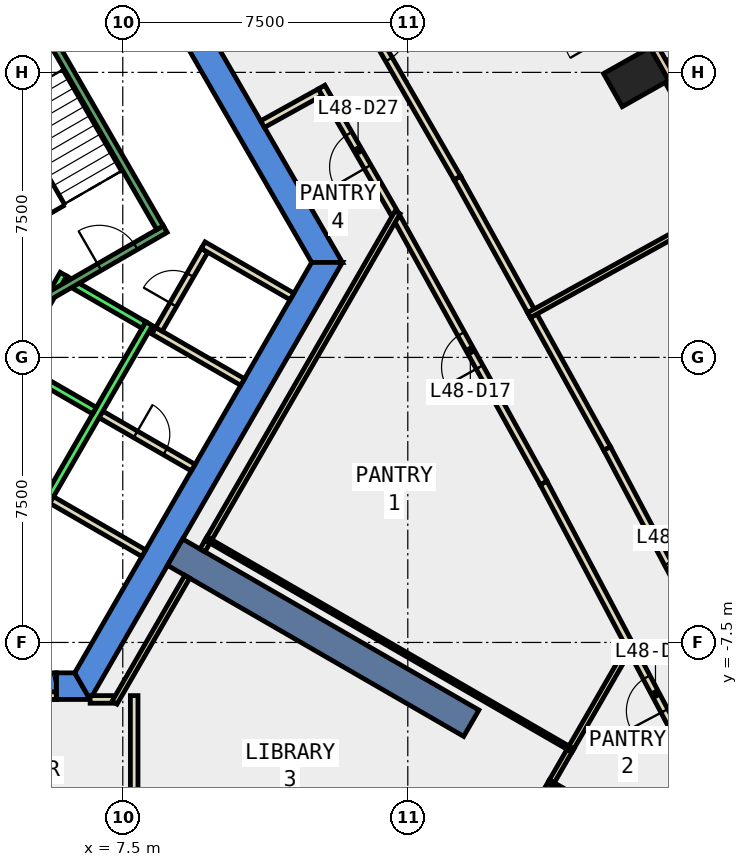
"""IFC4 building model, lengths in metres.
Left out: names, types, materials, properties, quantities, classifications, styles, units other than length and angle.
Written with IfcOpenShell. Run it as: python <this file> out.ifc"""

import sys

from ifc_helpers import new_model, si_unit, direction, frame, frame_2d, origin, origin_2d, place, context, subcontext, project, spatial, polyline, rectangle, outline, extrude, element, fill, save


model = new_model("IFC4")
c1 = context("Model", 3, precision=1e-05, world=origin(), true_north=direction((0.0, 1.0)))
c2 = subcontext(c1, "Body", "Model", "MODEL_VIEW")
j1 = project(units=[si_unit("LENGTHUNIT", "METRE"), si_unit("PLANEANGLEUNIT", "RADIAN")], contexts=[c1])
p1 = place(None, origin())
s1 = spatial("IfcSite", under=j1, at=p1, CompositionType="ELEMENT")
p2 = place(p1, origin())
s2 = spatial("IfcBuilding", under=s1, at=p2, CompositionType="ELEMENT")
p3 = place(p2, frame((0.0, 0.0, 215.0)))
s3 = spatial("IfcBuildingStorey", under=s2, at=p3, CompositionType="ELEMENT", Elevation=215.0)
p4 = place(p3, frame((21.007, 7.377, -0.4), z_axis=(0.0, 0.0, 1.0), x_axis=(-0.491435856222, 0.870913772551, 0.0)))
e1 = element("IfcColumn", 1, at=p4, inside=s3, PredefinedType="COLUMN", context=c2, shape_type="SweptSolid", body=[
    extrude(rectangle(XDim=1.0, YDim=1.4, at=origin_2d()), origin(), (0.0, 0.0, 1.0), 4.2),
])
p5 = place(p3, frame((0.0, 0.0, -0.4)))
e2 = element("IfcWall", 2, at=p5, inside=s3, PredefinedType="SHEAR", context=c2, shape_type="SweptSolid", body=[
    extrude(outline(polyline([(8.084, 11.498), (7.478, 11.148), (12.471, 2.5), (13.279, 2.5), (8.084, 11.498)])), origin(), (0.0, 0.0, 1.0), 4.2),
])
p6 = place(p3, frame((0.0, 0.0, -0.4)))
e3 = element("IfcWall", 3, at=p6, inside=s3, PredefinedType="SHEAR", context=c2, shape_type="SweptSolid", body=[
    extrude(outline(polyline([(5.75, -8.3), (5.75, -9.0), (6.64, -9.0), (6.235, -8.3), (5.75, -8.3)])), origin(), (0.0, 0.0, 1.0), 4.2),
])
p7 = place(p3, frame((0.0, 0.0, 3.6)))
e4 = element("IfcWall", 4, at=p7, inside=s3, PredefinedType="SHEAR", context=c2, shape_type="SweptSolid", body=[
    extrude(outline(polyline([(5.75, -9.0), (5.75, -8.3), (3.75, -8.3), (3.75, -9.0), (5.75, -9.0)])), origin(), (0.0, 0.0, 1.0), 0.2),
])
p8 = place(p3, frame((0.0, 0.0, -0.4)))
e5 = element("IfcWall", 5, at=p8, inside=s3, PredefinedType="SHEAR", context=c2, shape_type="SweptSolid", body=[
    extrude(outline(polyline([(6.64, -9.0), (13.279, 2.5), (12.471, 2.5), (6.235, -8.3), (6.64, -9.0)])), origin(), (0.0, 0.0, 1.0), 4.2),
])
p9 = place(p3, frame((8.877, -5.125, -0.4), z_axis=(0.0, 0.0, 1.0), x_axis=(0.866017533419, -0.500013631625, 0.0)))
e6 = element("IfcWall", 6, at=p9, inside=s3, PredefinedType="SHEAR", context=c2, shape_type="SweptSolid", body=[
    extrude(rectangle(XDim=9.0, YDim=0.8, at=frame_2d((4.5, 0.0))), origin(), (0.0, 0.0, 1.0), 4.2),
])
p10 = place(p3, frame((21.95, 7.334, 0.0), z_axis=(0.0, 0.0, 1.0), x_axis=(-0.491743606947, 0.87074004446, 0.0)))
e7 = element("IfcWall", 7, at=p10, inside=s3, PredefinedType="STANDARD", context=c2, shape_type="SweptSolid", body=[
    extrude(rectangle(XDim=1.0, YDim=0.2, at=frame_2d((0.5, 0.0))), origin(), (0.0, 0.0, 1.0), 3.8),
])
p11 = place(p3, frame((25.411, 0.968, 0.0), z_axis=(0.0, 0.0, 1.0), x_axis=(-0.484163461668, 0.87497756679, 0.0)))
e8 = element("IfcWall", 8, at=p11, inside=s3, PredefinedType="STANDARD", context=c2, shape_type="SweptSolid", body=[
    extrude(rectangle(XDim=7.247, YDim=0.3, at=frame_2d((3.624, 0.0))), origin(), (0.0, 0.0, 1.0), 3.8),
])
p12 = place(p11, frame((0.612, 0.0, 0.9)))
e9 = element("IfcOpeningElement", 9, at=p12, cuts=e8, PredefinedType="OPENING", context=c2, shape_type="SweptSolid", body=[
    extrude(rectangle(XDim=2.4, YDim=2.6, at=frame_2d((1.2, 1.3))), frame((0.0, 0.16, 0.0), z_axis=(0.0, -1.0, 0.0), x_axis=(1.0, 0.0, 0.0)), (0.0, 0.0, 1.0), 0.32),
])
p13 = place(p11, frame((4.235, 0.0, 0.9)))
e10 = element("IfcOpeningElement", 10, at=p13, cuts=e8, PredefinedType="OPENING", context=c2, shape_type="SweptSolid", body=[
    extrude(rectangle(XDim=2.4, YDim=2.6, at=frame_2d((1.2, 1.3))), frame((0.0, 0.16, 0.0), z_axis=(0.0, -1.0, 0.0), x_axis=(1.0, 0.0, 0.0)), (0.0, 0.0, 1.0), 0.32),
])
p14 = place(p3, frame((14.652, 3.783, 0.0), z_axis=(0.0, 0.0, 1.0), x_axis=(-0.499821427992, 0.866128477837, 0.0)))
e11 = element("IfcWall", 11, at=p14, inside=s3, PredefinedType="PARTITIONING", context=c2, shape_type="SweptSolid", body=[
    extrude(rectangle(XDim=3.844, YDim=0.2, at=frame_2d((1.922, 0.0))), origin(), (0.0, 0.0, 1.0), 3.8),
])
p15 = place(p14, frame((1.421, 0.0, 0.0)))
e12 = element("IfcOpeningElement", 12, at=p15, cuts=e11, PredefinedType="OPENING", context=c2, shape_type="SweptSolid", body=[
    extrude(rectangle(XDim=1.0, YDim=2.1, at=frame_2d((0.5, 1.05))), frame((0.0, 0.11, 0.0), z_axis=(0.0, -1.0, 0.0), x_axis=(1.0, 0.0, 0.0)), (0.0, 0.0, 1.0), 0.22),
])
p16 = place(p3, frame((12.693, 6.976, 0.0), z_axis=(0.0, 0.0, 1.0), x_axis=(-0.874908151187, -0.484288887944, 0.0)))
e13 = element("IfcWall", 13, at=p16, inside=s3, PredefinedType="PARTITIONING", context=c2, shape_type="SweptSolid", body=[
    extrude(rectangle(XDim=1.731, YDim=0.2, at=frame_2d((0.865, 0.0))), origin(), (0.0, 0.0, 1.0), 3.8),
])
p17 = place(p3, frame((20.882, -7.659, 0.0), z_axis=(0.0, 0.0, 1.0), x_axis=(-0.468206254133, 0.883619207346, 0.0)))
e14 = element("IfcWall", 14, at=p17, inside=s3, PredefinedType="PARTITIONING", context=c2, shape_type="SweptSolid", body=[
    extrude(rectangle(XDim=4.93, YDim=0.2, at=frame_2d((2.465, 0.0))), origin(), (0.0, 0.0, 1.0), 3.8),
])
p18 = place(p3, frame((18.574, -3.303, 0.0), z_axis=(0.0, 0.0, 1.0), x_axis=(-0.484239190765, 0.874935658279, 0.0)))
e15 = element("IfcWall", 15, at=p18, inside=s3, PredefinedType="PARTITIONING", context=c2, shape_type="SweptSolid", body=[
    extrude(rectangle(XDim=7.963, YDim=0.2, at=frame_2d((3.981, 0.0))), origin(), (0.0, 0.0, 1.0), 3.8),
])
p19 = place(p18, frame((3.482, 0.0, 0.0)))
e16 = element("IfcOpeningElement", 16, at=p19, cuts=e15, PredefinedType="OPENING", context=c2, shape_type="SweptSolid", body=[
    extrude(rectangle(XDim=1.0, YDim=2.1, at=frame_2d((0.5, 1.05))), frame((0.0, 0.11, 0.0), z_axis=(0.0, -1.0, 0.0), x_axis=(1.0, 0.0, 0.0)), (0.0, 0.0, 1.0), 0.22),
])
p20 = place(p3, frame((22.154, -10.06, 0.0), z_axis=(0.0, 0.0, 1.0), x_axis=(-0.468114756541, 0.883667683413, 0.0)))
e17 = element("IfcWall", 17, at=p20, inside=s3, PredefinedType="PARTITIONING", context=c2, shape_type="SweptSolid", body=[
    extrude(rectangle(XDim=2.717, YDim=0.2, at=frame_2d((1.359, 0.0))), origin(), (0.0, 0.0, 1.0), 3.8),
])
p21 = place(p20, frame((0.859, 0.0, 0.0)))
e18 = element("IfcOpeningElement", 18, at=p21, cuts=e17, PredefinedType="OPENING", context=c2, shape_type="SweptSolid", body=[
    extrude(rectangle(XDim=1.0, YDim=2.1, at=frame_2d((0.5, 1.05))), frame((0.0, 0.11, 0.0), z_axis=(0.0, -1.0, 0.0), x_axis=(1.0, 0.0, 0.0)), (0.0, 0.0, 1.0), 0.22),
])
p22 = place(p3, frame((18.312, 1.094, 0.0), z_axis=(0.0, 0.0, 1.0), x_axis=(0.484328424129, -0.874886265511, 0.0)))
e19 = element("IfcWall", 19, at=p22, inside=s3, PredefinedType="PARTITIONING", context=c2, shape_type="SweptSolid", body=[
    extrude(rectangle(XDim=3.991, YDim=0.2, at=frame_2d((1.996, 0.0))), origin(), (0.0, 0.0, 1.0), 3.8),
])
p23 = place(p3, frame((20.245, -2.398, 0.0), z_axis=(0.0, 0.0, 1.0), x_axis=(0.468063775621, -0.883694688199, 0.0)))
e20 = element("IfcWall", 20, at=p23, inside=s3, PredefinedType="PARTITIONING", context=c2, shape_type="SweptSolid", body=[
    extrude(rectangle(XDim=7.836, YDim=0.2, at=frame_2d((3.918, 0.0))), origin(), (0.0, 0.0, 1.0), 3.8),
])
p24 = place(p23, frame((3.418, 0.0, 0.0)))
e21 = element("IfcOpeningElement", 21, at=p24, cuts=e20, PredefinedType="OPENING", context=c2, shape_type="SweptSolid", body=[
    extrude(rectangle(XDim=1.0, YDim=2.1, at=frame_2d((0.5, 1.05))), frame((0.0, 0.11, 0.0), z_axis=(0.0, -1.0, 0.0), x_axis=(1.0, 0.0, 0.0)), (0.0, 0.0, 1.0), 0.22),
])
p25 = place(p3, frame((12.202, 11.828, 0.0), z_axis=(0.0, 0.0, 1.0), x_axis=(0.499919823193, -0.866071688937, 0.0)))
e22 = element("IfcWall", 22, at=p25, inside=s3, PredefinedType="PARTITIONING", context=c2, shape_type="SweptSolid", body=[
    extrude(rectangle(XDim=8.209, YDim=0.2, at=frame_2d((4.104, 0.0))), origin(), (0.0, 0.0, 1.0), 3.8),
])
p26 = place(p25, frame((3.604, 0.0, 0.0)))
e23 = element("IfcOpeningElement", 23, at=p26, cuts=e22, PredefinedType="OPENING", context=c2, shape_type="SweptSolid", body=[
    extrude(rectangle(XDim=1.0, YDim=2.1, at=frame_2d((0.5, 1.05))), frame((0.0, 0.11, 0.0), z_axis=(0.0, -1.0, 0.0), x_axis=(1.0, 0.0, 0.0)), (0.0, 0.0, 1.0), 0.22),
])
p27 = place(p3, frame((16.306, 4.718, 0.0), z_axis=(0.0, 0.0, 1.0), x_axis=(0.484411997038, -0.874839995156, 0.0)))
e24 = element("IfcWall", 24, at=p27, inside=s3, PredefinedType="PARTITIONING", context=c2, shape_type="SweptSolid", body=[
    extrude(rectangle(XDim=3.993, YDim=0.2, at=frame_2d((1.996, 0.0))), origin(), (0.0, 0.0, 1.0), 3.8),
])
p28 = place(p3, frame((8.053, -5.152, 0.0), z_axis=(0.0, 0.0, 1.0), x_axis=(-0.865808344015, 0.500375770231, 0.0)))
e25 = element("IfcWall", 25, at=p28, inside=s3, PredefinedType="PARTITIONING", context=c2, shape_type="SweptSolid", body=[
    extrude(rectangle(XDim=2.9, YDim=0.2, at=frame_2d((1.45, 0.0))), origin(), (0.0, 0.0, 1.0), 3.8),
])
p29 = place(p3, frame((6.841, -1.451, 0.0), z_axis=(0.0, 0.0, 1.0), x_axis=(0.866220623736, -0.499661716578, 0.0)))
e26 = element("IfcWall", 26, at=p29, inside=s3, PredefinedType="PARTITIONING", context=c2, shape_type="SweptSolid", body=[
    extrude(rectangle(XDim=2.9, YDim=0.2, at=frame_2d((1.45, 0.0))), origin(), (0.0, 0.0, 1.0), 3.8),
])
p30 = place(p29, frame((1.15, 0.0, 0.0)))
e27 = element("IfcOpeningElement", 27, at=p30, cuts=e26, PredefinedType="OPENING", context=c2, shape_type="SweptSolid", body=[
    extrude(rectangle(XDim=0.9, YDim=2.1, at=frame_2d((0.45, 1.05))), frame((0.0, 0.11, 0.0), z_axis=(0.0, -1.0, 0.0), x_axis=(1.0, 0.0, 0.0)), (0.0, 0.0, 1.0), 0.22),
])
p31 = place(p3, frame((10.653, -0.648, 0.0), z_axis=(0.0, 0.0, 1.0), x_axis=(-0.866036505625, 0.499980770555, 0.0)))
e28 = element("IfcWall", 28, at=p31, inside=s3, PredefinedType="PARTITIONING", context=c2, shape_type="SweptSolid", body=[
    extrude(rectangle(XDim=2.7, YDim=0.2, at=frame_2d((1.35, 0.0))), origin(), (0.0, 0.0, 1.0), 3.8),
])
p32 = place(p3, frame((8.451, 0.738, 0.0), z_axis=(0.0, 0.0, 1.0), x_axis=(0.499913221443, 0.866075499611, 0.0)))
e29 = element("IfcWall", 29, at=p32, inside=s3, PredefinedType="PARTITIONING", context=c2, shape_type="SweptSolid", body=[
    extrude(rectangle(XDim=2.4, YDim=0.2, at=frame_2d((1.2, 0.0))), origin(), (0.0, 0.0, 1.0), 3.8),
])
p33 = place(p32, frame((0.75, 0.0, 0.0)))
e30 = element("IfcOpeningElement", 30, at=p33, cuts=e29, PredefinedType="OPENING", context=c2, shape_type="SweptSolid", body=[
    extrude(rectangle(XDim=0.9, YDim=2.1, at=frame_2d((0.45, 1.05))), frame((0.0, 0.11, 0.0), z_axis=(0.0, -1.0, 0.0), x_axis=(1.0, 0.0, 0.0)), (0.0, 0.0, 1.0), 0.22),
])
p34 = place(p3, frame((9.615, 2.953, 0.0), z_axis=(0.0, 0.0, 1.0), x_axis=(0.866013897511, -0.50001992892, 0.0)))
e31 = element("IfcWall", 31, at=p34, inside=s3, PredefinedType="PARTITIONING", context=c2, shape_type="SweptSolid", body=[
    extrude(rectangle(XDim=2.7, YDim=0.2, at=frame_2d((1.35, 0.0))), origin(), (0.0, 0.0, 1.0), 3.8),
])
p35 = place(p3, frame((6.641, -8.999, 0.0), z_axis=(0.0, 0.0, 1.0), x_axis=(1.0, 0.0, 0.0)))
e32 = element("IfcWall", 32, at=p35, inside=s3, PredefinedType="PARTITIONING", context=c2, shape_type="SweptSolid", body=[
    extrude(rectangle(XDim=0.617, YDim=0.2, at=frame_2d((0.309, 0.0))), origin(), (0.0, 0.0, 1.0), 3.8),
])
p36 = place(p3, frame((7.283, -9.086, 0.0), z_axis=(0.0, 0.0, 1.0), x_axis=(0.500035303972, 0.866005020067, 0.0)))
e33 = element("IfcWall", 33, at=p36, inside=s3, PredefinedType="PARTITIONING", context=c2, shape_type="SweptSolid", body=[
    extrude(rectangle(XDim=3.828, YDim=0.15, at=frame_2d((1.914, 0.0))), origin(), (0.0, 0.0, 1.0), 3.8),
])
p37 = place(p3, frame((9.779, -4.762, 0.0), z_axis=(0.0, 0.0, 1.0), x_axis=(0.499990552429, 0.866030858274, 0.0)))
e34 = element("IfcWall", 34, at=p37, inside=s3, PredefinedType="PARTITIONING", context=c2, shape_type="SweptSolid", body=[
    extrude(rectangle(XDim=9.906, YDim=0.15, at=frame_2d((4.953, 0.0))), origin(), (0.0, 0.0, 1.0), 3.8),
])
p38 = place(p3, frame((7.8, -8.899, 0.0), z_axis=(0.0, 0.0, 1.0), x_axis=(0.0, -1.0, 0.0)))
e35 = element("IfcWall", 35, at=p38, inside=s3, PredefinedType="PARTITIONING", context=c2, shape_type="SweptSolid", body=[
    extrude(rectangle(XDim=6.06, YDim=0.2, at=frame_2d((3.03, 0.0))), origin(), (0.0, 0.0, 1.0), 3.8),
])
p39 = place(p3, frame((9.689, -4.768, 0.0), z_axis=(0.0, 0.0, 1.0), x_axis=(0.866023322577, -0.500003604739, 0.0)))
e36 = element("IfcWall", 36, at=p39, inside=s3, PredefinedType="PARTITIONING", context=c2, shape_type="SweptSolid", body=[
    extrude(rectangle(XDim=11.15, YDim=0.1, at=frame_2d((5.575, 0.0))), origin(), (0.0, 0.0, 1.0), 3.8),
])
p40 = place(p3, frame((18.789, -11.156, 0.0), z_axis=(0.0, 0.0, 1.0), x_axis=(-0.499822078765, -0.866128102292, 0.0)))
e37 = element("IfcWall", 37, at=p40, inside=s3, PredefinedType="PARTITIONING", context=c2, shape_type="SweptSolid", body=[
    extrude(rectangle(XDim=4.313, YDim=0.15, at=frame_2d((2.157, 0.0))), origin(), (0.0, 0.0, 1.0), 3.8),
])
p41 = place(p3, frame((19.255, -10.349, 0.0), z_axis=(0.0, 0.0, 1.0), x_axis=(-0.499185199876, -0.866495318063, 0.0)))
e38 = element("IfcWall", 38, at=p41, inside=s3, PredefinedType="PARTITIONING", context=c2, shape_type="SweptSolid", body=[
    extrude(rectangle(XDim=0.931, YDim=0.15, at=frame_2d((0.466, 0.0))), origin(), (0.0, 0.0, 1.0), 3.8),
])
p42 = place(p3, frame((20.847, -7.593, 0.0), z_axis=(0.0, 0.0, 1.0), x_axis=(-0.500261762561, -0.865874222343, 0.0)))
e39 = element("IfcWall", 39, at=p42, inside=s3, PredefinedType="PARTITIONING", context=c2, shape_type="SweptSolid", body=[
    extrude(rectangle(XDim=3.082, YDim=0.15, at=frame_2d((1.541, 0.0))), origin(), (0.0, 0.0, 1.0), 3.8),
])
p43 = place(p3, frame((18.765, -11.199, 0.0), z_axis=(0.0, 0.0, 1.0), x_axis=(0.866038964406, -0.499976511579, 0.0)))
e40 = element("IfcWall", 40, at=p43, inside=s3, PredefinedType="PARTITIONING", context=c2, shape_type="SweptSolid", body=[
    extrude(rectangle(XDim=4.242, YDim=0.1, at=frame_2d((2.121, 0.0))), origin(), (0.0, 0.0, 1.0), 3.8),
])
p44 = place(p3, frame((18.189, 1.111, 0.0), z_axis=(0.0, 0.0, 1.0), x_axis=(0.874928335558, 0.484252421405, 0.0)))
e41 = element("IfcWall", 41, at=p44, inside=s3, PredefinedType="PARTITIONING", context=c2, shape_type="SweptSolid", body=[
    extrude(rectangle(XDim=6.1, YDim=0.15, at=frame_2d((3.05, 0.0))), origin(), (0.0, 0.0, 1.0), 3.8),
])
p45 = place(p3, frame((3.75, -8.9, 0.0), z_axis=(0.0, 0.0, 1.0), x_axis=(1.0, 0.0, 0.0)))
e42 = element("IfcWall", 42, at=p45, inside=s3, PredefinedType="PARTITIONING", context=c2, shape_type="SweptSolid", body=[
    extrude(rectangle(XDim=2.0, YDim=0.2, at=frame_2d((1.0, 0.0))), origin(), (0.0, 0.0, 1.0), 2.4),
])
p46 = place(p45, frame((0.19, 0.0, 0.0)))
e43 = element("IfcOpeningElement", 43, at=p46, cuts=e42, PredefinedType="OPENING", context=c2, shape_type="SweptSolid", body=[
    extrude(rectangle(XDim=1.8, YDim=2.1, at=frame_2d((0.9, 1.05))), frame((0.0, 0.11, 0.0), z_axis=(0.0, -1.0, 0.0), x_axis=(1.0, 0.0, 0.0)), (0.0, 0.0, 1.0), 0.22),
])
p47 = place(p3, frame((9.596, -5.079, 0.0), z_axis=(0.0, 0.0, 1.0), x_axis=(0.500782702656, 0.865573038351, 0.0)))
e44 = element("IfcWall", 44, at=p47, inside=s3, PredefinedType="PARTITIONING", context=c2, shape_type="SweptSolid", body=[
    extrude(rectangle(XDim=0.266, YDim=0.15, at=frame_2d((0.133, 0.0))), origin(), (0.0, 0.0, 1.0), 3.8),
])
p48 = place(p3, frame((3.24, -2.488, 0.0), z_axis=(0.0, 0.0, 1.0), x_axis=(0.500034260056, 0.866005622828, 0.0)))
e45 = element("IfcWall", 45, at=p48, inside=s3, PredefinedType="STANDARD", context=c2, shape_type="SweptSolid", body=[
    extrude(rectangle(XDim=5.399, YDim=0.2, at=frame_2d((2.7, 0.0))), origin(), (0.0, 0.0, 1.0), 3.8),
])
p49 = place(p48, frame((3.225, 0.0, 0.0)))
e46 = element("IfcOpeningElement", 46, at=p49, cuts=e45, PredefinedType="OPENING", context=c2, shape_type="SweptSolid", body=[
    extrude(rectangle(XDim=1.1, YDim=2.1, at=frame_2d((0.55, 1.05))), frame((0.0, 0.11, 0.0), z_axis=(0.0, -1.0, 0.0), x_axis=(1.0, 0.0, 0.0)), (0.0, 0.0, 1.0), 0.22),
])
p50 = place(p48, frame((1.225, 0.0, 0.0)))
e47 = element("IfcOpeningElement", 47, at=p50, cuts=e45, PredefinedType="OPENING", context=c2, shape_type="SweptSolid", body=[
    extrude(rectangle(XDim=1.1, YDim=2.1, at=frame_2d((0.55, 1.05))), frame((0.0, 0.11, 0.0), z_axis=(0.0, -1.0, 0.0), x_axis=(1.0, 0.0, 0.0)), (0.0, 0.0, 1.0), 0.22),
])
p51 = place(p3, frame((5.492, -3.788, 0.0), z_axis=(0.0, 0.0, 1.0), x_axis=(0.500034260056, 0.866005622828, 0.0)))
e48 = element("IfcWall", 48, at=p51, inside=s3, PredefinedType="STANDARD", context=c2, shape_type="SweptSolid", body=[
    extrude(rectangle(XDim=5.399, YDim=0.2, at=frame_2d((2.7, 0.0))), origin(), (0.0, 0.0, 1.0), 3.8),
])
for number, where, z_axis, x_axis in (
    (49, (4.677, -0.2, 0.0), (0.0, 0.0, 1.0), (0.866, -0.5, 0.0)),
    (50, (5.977, 2.052, 0.0), (0.0, 0.0, 1.0), (0.866, -0.5, 0.0)),
):
    element("IfcWall", number, at=place(p3, frame(where, z_axis=z_axis, x_axis=x_axis)), inside=s3, PredefinedType="STANDARD", context=c2, shape_type="SweptSolid", body=[
        extrude(rectangle(XDim=2.399, YDim=0.2, at=frame_2d((1.2, 0.0))), origin(), (0.0, 0.0, 1.0), 3.8),
    ])
p52 = place(p3, frame((4.806, 1.176, 0.0), z_axis=(0.0, 0.0, 1.0), x_axis=(0.866059941101, 0.499940174841, 0.0)))
e51 = element("IfcWall", 51, at=p52, inside=s3, PredefinedType="STANDARD", context=c2, shape_type="SweptSolid", body=[
    extrude(rectangle(XDim=4.4, YDim=0.2, at=frame_2d((2.2, 0.0))), origin(), (0.0, 0.0, 1.0), 3.8),
])
p53 = place(p52, frame((2.4, 0.0, 0.0)))
e52 = element("IfcOpeningElement", 52, at=p53, cuts=e51, PredefinedType="OPENING", context=c2, shape_type="SweptSolid", body=[
    extrude(rectangle(XDim=1.1, YDim=2.2, at=frame_2d((0.55, 1.1))), frame((0.0, 0.11, 0.0), z_axis=(0.0, -1.0, 0.0), x_axis=(1.0, 0.0, 0.0)), (0.0, 0.0, 1.0), 0.22),
])
p54 = place(p3, frame((8.48, 3.412, 0.0), z_axis=(0.0, 0.0, 1.0), x_axis=(-0.499978703459, 0.866037698999, 0.0)))
e53 = element("IfcWall", 53, at=p54, inside=s3, PredefinedType="STANDARD", context=c2, shape_type="SweptSolid", body=[
    extrude(rectangle(XDim=6.9, YDim=0.2, at=frame_2d((3.45, 0.0))), origin(), (0.0, 0.0, 1.0), 3.8),
])
p55 = place(p24, origin())
e54 = element("IfcDoor", 54, at=p55, inside=s3, OperationType="SINGLE_SWING_LEFT", PredefinedType="DOOR", context=c2, shape_type="SweptSolid", body=[
    extrude(rectangle(XDim=1.0, YDim=2.1, at=frame_2d((0.5, 1.05))), frame((0.0, 0.025, 0.0), z_axis=(0.0, -1.0, 0.0), x_axis=(1.0, 0.0, 0.0)), (0.0, 0.0, 1.0), 0.05),
])
fill(e21, e54)
p56 = place(p26, origin())
e55 = element("IfcDoor", 55, at=p56, inside=s3, OperationType="SINGLE_SWING_RIGHT", PredefinedType="DOOR", context=c2, shape_type="SweptSolid", body=[
    extrude(rectangle(XDim=1.0, YDim=2.1, at=frame_2d((0.5, 1.05))), frame((0.0, 0.025, 0.0), z_axis=(0.0, -1.0, 0.0), x_axis=(1.0, 0.0, 0.0)), (0.0, 0.0, 1.0), 0.05),
])
fill(e23, e55)
p57 = place(p19, origin())
e56 = element("IfcDoor", 56, at=p57, inside=s3, OperationType="SINGLE_SWING_LEFT", PredefinedType="DOOR", context=c2, shape_type="SweptSolid", body=[
    extrude(rectangle(XDim=1.0, YDim=2.1, at=frame_2d((0.5, 1.05))), frame((0.0, 0.025, 0.0), z_axis=(0.0, -1.0, 0.0), x_axis=(1.0, 0.0, 0.0)), (0.0, 0.0, 1.0), 0.05),
])
fill(e16, e56)
p58 = place(p21, origin())
e57 = element("IfcDoor", 57, at=p58, inside=s3, OperationType="SINGLE_SWING_LEFT", PredefinedType="DOOR", context=c2, shape_type="SweptSolid", body=[
    extrude(rectangle(XDim=1.0, YDim=2.1, at=frame_2d((0.5, 1.05))), frame((0.0, 0.025, 0.0), z_axis=(0.0, -1.0, 0.0), x_axis=(1.0, 0.0, 0.0)), (0.0, 0.0, 1.0), 0.05),
])
fill(e18, e57)
p59 = place(p15, origin())
e58 = element("IfcDoor", 58, at=p59, inside=s3, OperationType="SINGLE_SWING_LEFT", PredefinedType="DOOR", context=c2, shape_type="SweptSolid", body=[
    extrude(rectangle(XDim=1.0, YDim=2.1, at=frame_2d((0.5, 1.05))), frame((0.0, 0.025, 0.0), z_axis=(0.0, -1.0, 0.0), x_axis=(1.0, 0.0, 0.0)), (0.0, 0.0, 1.0), 0.05),
])
fill(e12, e58)
p60 = place(p30, origin())
e59 = element("IfcDoor", 59, at=p60, inside=s3, OperationType="SINGLE_SWING_LEFT", PredefinedType="DOOR", context=c2, shape_type="SweptSolid", body=[
    extrude(rectangle(XDim=0.9, YDim=2.1, at=frame_2d((0.45, 1.05))), frame((0.0, 0.025, 0.0), z_axis=(0.0, -1.0, 0.0), x_axis=(1.0, 0.0, 0.0)), (0.0, 0.0, 1.0), 0.05),
])
fill(e27, e59)
p61 = place(p33, origin())
e60 = element("IfcDoor", 60, at=p61, inside=s3, OperationType="SINGLE_SWING_LEFT", PredefinedType="DOOR", context=c2, shape_type="SweptSolid", body=[
    extrude(rectangle(XDim=0.9, YDim=2.1, at=frame_2d((0.45, 1.05))), frame((0.0, 0.025, 0.0), z_axis=(0.0, -1.0, 0.0), x_axis=(1.0, 0.0, 0.0)), (0.0, 0.0, 1.0), 0.05),
])
fill(e30, e60)
p62 = place(p46, origin())
e61 = element("IfcDoor", 61, at=p62, inside=s3, OperationType="DOUBLE_DOOR_SINGLE_SWING", PredefinedType="DOOR", context=c2, shape_type="SweptSolid", body=[
    extrude(rectangle(XDim=1.8, YDim=2.1, at=frame_2d((0.9, 1.05))), frame((0.0, 0.025, 0.0), z_axis=(0.0, -1.0, 0.0), x_axis=(1.0, 0.0, 0.0)), (0.0, 0.0, 1.0), 0.05),
])
fill(e43, e61)
p63 = place(p53, origin())
e62 = element("IfcDoor", 62, at=p63, inside=s3, OperationType="SINGLE_SWING_LEFT", PredefinedType="DOOR", context=c2, shape_type="SweptSolid", body=[
    extrude(rectangle(XDim=1.1, YDim=2.2, at=frame_2d((0.55, 1.1))), frame((0.0, 0.025, 0.0), z_axis=(0.0, -1.0, 0.0), x_axis=(1.0, 0.0, 0.0)), (0.0, 0.0, 1.0), 0.05),
])
fill(e52, e62)
save(model, sys.argv[1])
